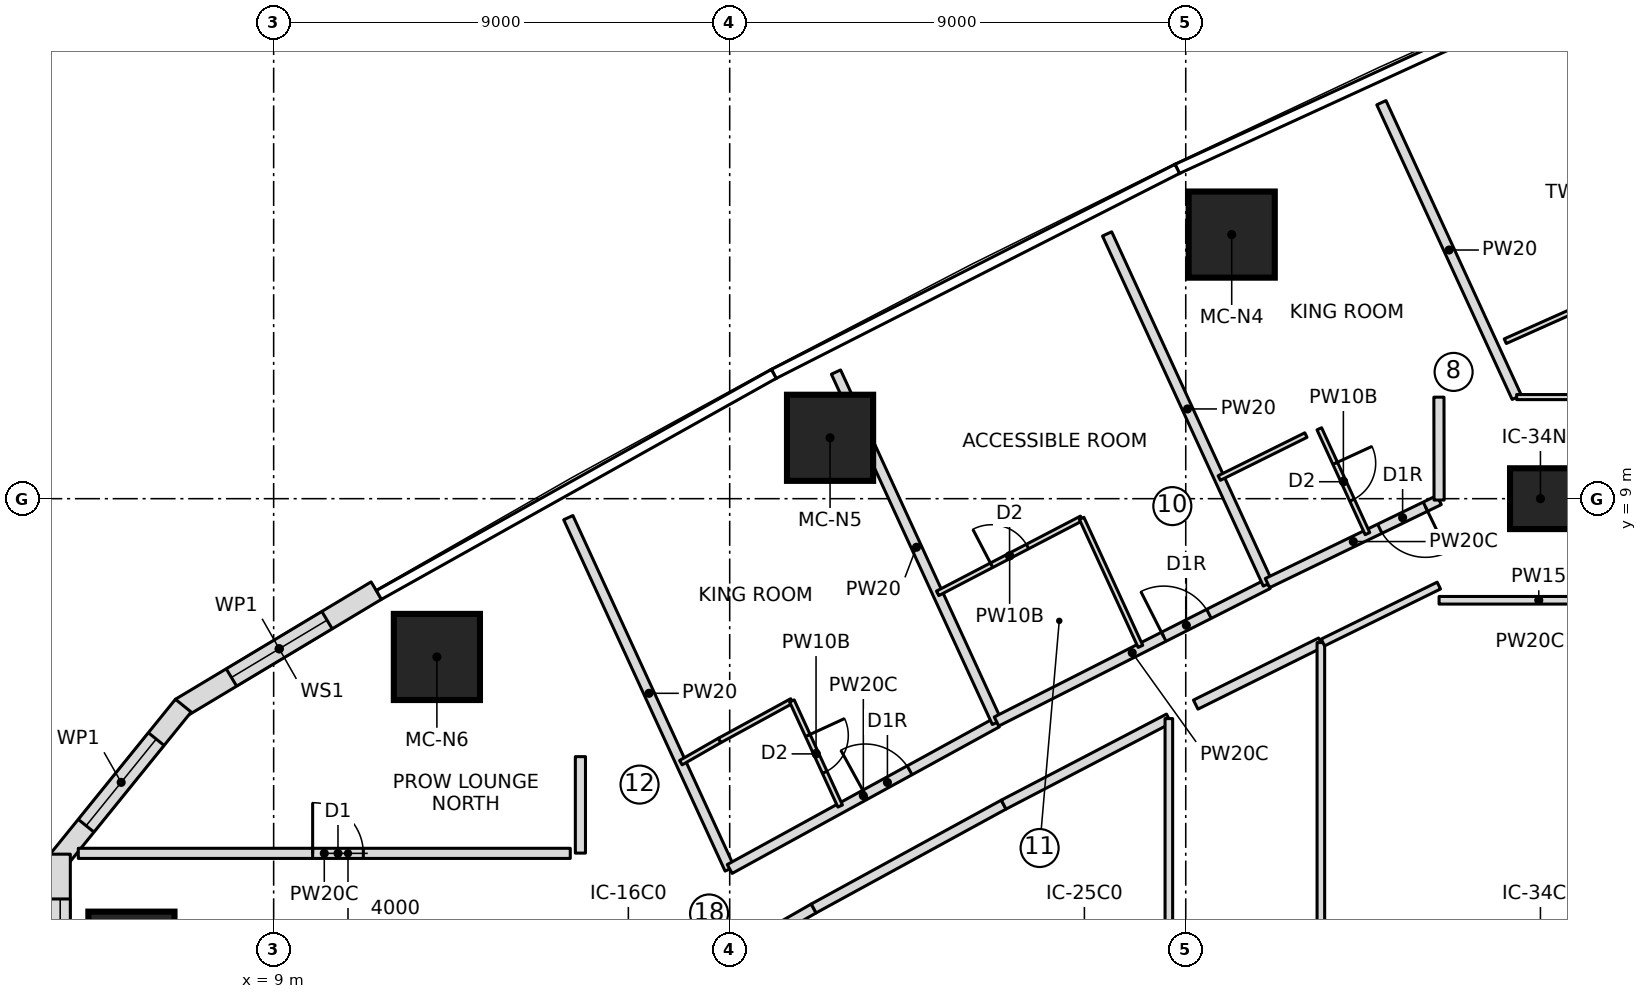
"""IFC4 building model, lengths in metres.
Left out: names, types, materials, properties, quantities, classifications, styles, units other than length and angle.
Written with IfcOpenShell. Run it as: python <this file> out.ifc"""

import sys

from ifc_helpers import new_model, si_unit, direction, frame, frame_2d, origin, origin_2d, place, context, subcontext, project, spatial, polyline, rectangle, outline, extrude, element, fill, save


model = new_model("IFC4")
c1 = context("Model", 3, precision=1e-05, world=origin(), true_north=direction((0.0, 1.0)))
c2 = subcontext(c1, "Body", "Model", "MODEL_VIEW")
j1 = project(units=[si_unit("LENGTHUNIT", "METRE"), si_unit("PLANEANGLEUNIT", "RADIAN")], contexts=[c1])
p1 = place(None, origin())
s1 = spatial("IfcSite", under=j1, at=p1, CompositionType="ELEMENT")
p2 = place(p1, origin())
s2 = spatial("IfcBuilding", under=s1, at=p2, CompositionType="ELEMENT")
p3 = place(p2, frame((0.0, 0.0, 102.65)))
s3 = spatial("IfcBuildingStorey", under=s2, at=p3, CompositionType="ELEMENT", Elevation=102.65)
for number, where, z_axis, x_axis in (
    (1, (6.193, 0.0, 0.0), (0.0, 0.0, 1.0), (1.0, 0.0, 0.0)),
    (2, (27.907, 14.212, 0.0), (0.0, 0.0, 1.0), (1.0, 0.0, 0.0)),
    (3, (19.981, 10.202, 0.0), (0.0, 0.0, 1.0), (1.0, 0.0, 0.0)),
    (4, (12.221, 5.876, 0.0), (0.0, 0.0, 1.0), (1.0, 0.0, 0.0)),
):
    element("IfcColumn", number, at=place(p3, frame(where, z_axis=z_axis, x_axis=x_axis)), inside=s3, PredefinedType="COLUMN", context=c2, shape_type="SweptSolid", body=[
        extrude(rectangle(XDim=1.7, YDim=1.7, at=origin_2d()), origin(), (0.0, 0.0, 1.0), 3.55),
    ])
p4 = place(p3, frame((34.0, 9.0, 0.0), z_axis=(0.0, 0.0, 1.0), x_axis=(1.0, 0.0, 0.0)))
e5 = element("IfcColumn", 5, at=p4, inside=s3, PredefinedType="COLUMN", context=c2, shape_type="SweptSolid", body=[
    extrude(rectangle(XDim=1.2, YDim=1.2, at=origin_2d()), origin(), (0.0, 0.0, 1.0), 3.55),
])
p5 = place(p3, frame((11.026, 7.186, 0.0), z_axis=(0.0, 0.0, 1.0), x_axis=(-0.857550776474, -0.514399325202, 0.0)))
e6 = element("IfcWall", 6, at=p5, inside=s3, PredefinedType="NOTDEFINED", context=c2, shape_type="SweptSolid", body=[
    extrude(outline(polyline([(0.0, -0.2), (4.503, -0.2), (4.433, 0.2), (0.0, 0.2), (0.0, -0.2)])), origin(), (0.0, 0.0, 1.0), 3.25),
])
p6 = place(p5, frame((1.134, 0.0, 0.6)))
e7 = element("IfcOpeningElement", 7, at=p6, cuts=e6, PredefinedType="OPENING", context=c2, shape_type="SweptSolid", body=[
    extrude(outline(polyline([(0.0, 1.35), (0.084, 1.771), (0.322, 2.128), (0.679, 2.366), (1.1, 2.45), (1.521, 2.366), (1.878, 2.128), (2.116, 1.771), (2.2, 1.35), (2.2, 1.1), (2.116, 0.679), (1.878, 0.322), (1.521, 0.084), (1.1, 0.0), (0.679, 0.084), (0.322, 0.322), (0.084, 0.679), (0.0, 1.1), (0.0, 1.35)])), frame((0.0, 0.21, 0.0), z_axis=(0.0, -1.0, 0.0), x_axis=(1.0, 0.0, 0.0)), (0.0, 0.0, 1.0), 0.42),
])
p7 = place(p3, frame((7.194, 4.888, 0.0), z_axis=(0.0, 0.0, 1.0), x_axis=(-0.62903486133, -0.777377092042, 0.0)))
e8 = element("IfcWall", 8, at=p7, inside=s3, PredefinedType="NOTDEFINED", context=c2, shape_type="SweptSolid", body=[
    extrude(outline(polyline([(-0.035, -0.2), (3.897, -0.2), (3.756, 0.2), (0.035, 0.2), (-0.035, -0.2)])), origin(), (0.0, 0.0, 1.0), 3.25),
])
p8 = place(p7, frame((0.813, 0.0, 0.6)))
e9 = element("IfcOpeningElement", 9, at=p8, cuts=e8, PredefinedType="OPENING", context=c2, shape_type="SweptSolid", body=[
    extrude(outline(polyline([(0.0, 1.35), (0.084, 1.771), (0.322, 2.128), (0.679, 2.366), (1.1, 2.45), (1.521, 2.366), (1.878, 2.128), (2.116, 1.771), (2.2, 1.35), (2.2, 1.1), (2.116, 0.679), (1.878, 0.322), (1.521, 0.084), (1.1, 0.0), (0.679, 0.084), (0.322, 0.322), (0.084, 0.679), (0.0, 1.1), (0.0, 1.35)])), frame((0.0, 0.21, 0.0), z_axis=(0.0, -1.0, 0.0), x_axis=(1.0, 0.0, 0.0)), (0.0, 0.0, 1.0), 0.42),
])
p9 = place(p3, frame((4.787, 1.913, 0.0), z_axis=(0.0, 0.0, 1.0), x_axis=(0.0, -1.0, 0.0)))
e10 = element("IfcWall", 10, at=p9, inside=s3, PredefinedType="NOTDEFINED", context=c2, shape_type="SweptSolid", body=[
    extrude(outline(polyline([(-0.071, -0.2), (3.897, -0.2), (3.755, 0.2), (0.071, 0.2), (-0.071, -0.2)])), origin(), (0.0, 0.0, 1.0), 3.25),
])
p10 = place(p9, frame((0.813, 0.0, 0.6)))
e11 = element("IfcOpeningElement", 11, at=p10, cuts=e10, PredefinedType="OPENING", context=c2, shape_type="SweptSolid", body=[
    extrude(outline(polyline([(0.0, 1.35), (0.084, 1.771), (0.322, 2.128), (0.679, 2.366), (1.1, 2.45), (1.521, 2.366), (1.878, 2.128), (2.116, 1.771), (2.2, 1.35), (2.2, 1.1), (2.116, 0.679), (1.878, 0.322), (1.521, 0.084), (1.1, 0.0), (0.679, 0.084), (0.322, 0.322), (0.084, 0.679), (0.0, 1.1), (0.0, 1.35)])), frame((0.0, 0.21, 0.0), z_axis=(0.0, -1.0, 0.0), x_axis=(1.0, 0.0, 0.0)), (0.0, 0.0, 1.0), 0.42),
])
p11 = place(p3, frame((5.145, 2.0, 0.0), z_axis=(0.0, 0.0, 1.0), x_axis=(1.0, 0.0, 0.0)))
e12 = element("IfcWall", 12, at=p11, inside=s3, PredefinedType="PARTITIONING", context=c2, shape_type="SweptSolid", body=[
    extrude(rectangle(XDim=9.709, YDim=0.2, at=frame_2d((4.854, 0.0))), origin(), (0.0, 0.0, 1.0), 3.25),
])
p12 = place(p11, frame((4.625, 0.0, 0.0)))
e13 = element("IfcOpeningElement", 13, at=p12, cuts=e12, PredefinedType="OPENING", context=c2, shape_type="SweptSolid", body=[
    extrude(rectangle(XDim=1.0, YDim=2.1, at=frame_2d((0.5, 1.05))), frame((0.0, 0.11, 0.0), z_axis=(0.0, -1.0, 0.0), x_axis=(1.0, 0.0, 0.0)), (0.0, 0.0, 1.0), 0.22),
])
p13 = place(p3, frame((14.815, 8.626, 0.0), z_axis=(0.0, 0.0, 1.0), x_axis=(0.417432341259, -0.908708006166, 0.0)))
e14 = element("IfcWall", 14, at=p13, inside=s3, PredefinedType="PARTITIONING", context=c2, shape_type="SweptSolid", body=[
    extrude(rectangle(XDim=7.631, YDim=0.2, at=frame_2d((3.815, 0.0))), origin(), (0.0, 0.0, 1.0), 3.25),
])
p14 = place(p3, frame((18.0, 1.692, 0.0), z_axis=(0.0, 0.0, 1.0), x_axis=(0.876809096721, 0.480838650597, 0.0)))
e15 = element("IfcWall", 15, at=p14, inside=s3, PredefinedType="PARTITIONING", context=c2, shape_type="SweptSolid", body=[
    extrude(rectangle(XDim=6.015, YDim=0.2, at=frame_2d((3.008, 0.0))), origin(), (0.0, 0.0, 1.0), 3.25),
])
p15 = place(p14, frame((3.05, 0.0, 0.0)))
e16 = element("IfcOpeningElement", 16, at=p15, cuts=e15, PredefinedType="OPENING", context=c2, shape_type="SweptSolid", body=[
    extrude(rectangle(XDim=1.0, YDim=2.1, at=frame_2d((0.5, 1.05))), frame((0.0, 0.11, 0.0), z_axis=(0.0, -1.0, 0.0), x_axis=(1.0, 0.0, 0.0)), (0.0, 0.0, 1.0), 0.22),
])
p16 = place(p3, frame((17.036, 3.79, 0.0), z_axis=(0.0, 0.0, 1.0), x_axis=(0.867629162742, 0.497211862248, 0.0)))
e17 = element("IfcWall", 17, at=p16, inside=s3, PredefinedType="PARTITIONING", context=c2, shape_type="SweptSolid", body=[
    extrude(rectangle(XDim=0.882, YDim=0.1, at=frame_2d((0.441, 0.0))), origin(), (0.0, 0.0, 1.0), 3.25),
])
p17 = place(p3, frame((17.801, 4.229, 0.0), z_axis=(0.0, 0.0, 1.0), x_axis=(0.877424481957, 0.479714788663, 0.0)))
e18 = element("IfcWall", 18, at=p17, inside=s3, PredefinedType="PARTITIONING", context=c2, shape_type="SweptSolid", body=[
    extrude(rectangle(XDim=1.625, YDim=0.1, at=frame_2d((0.813, 0.0))), origin(), (0.0, 0.0, 1.0), 3.25),
])
p18 = place(p3, frame((19.228, 5.008, 0.0), z_axis=(0.0, 0.0, 1.0), x_axis=(0.417450047292, -0.908699872354, 0.0)))
e19 = element("IfcWall", 19, at=p18, inside=s3, PredefinedType="PARTITIONING", context=c2, shape_type="SweptSolid", body=[
    extrude(rectangle(XDim=2.283, YDim=0.1, at=frame_2d((1.141, 0.0))), origin(), (0.0, 0.0, 1.0), 3.25),
])
p19 = place(p18, frame((0.75, 0.0, 0.0)))
e20 = element("IfcOpeningElement", 20, at=p19, cuts=e19, PredefinedType="OPENING", context=c2, shape_type="SweptSolid", body=[
    extrude(rectangle(XDim=0.8, YDim=2.1, at=frame_2d((0.4, 1.05))), frame((0.0, 0.06, 0.0), z_axis=(0.0, -1.0, 0.0), x_axis=(1.0, 0.0, 0.0)), (0.0, 0.0, 1.0), 0.12),
])
p20 = place(p3, frame((23.274, 4.584, 0.0), z_axis=(0.0, 0.0, 1.0), x_axis=(-0.417440028355, 0.908704474913, 0.0)))
e21 = element("IfcWall", 21, at=p20, inside=s3, PredefinedType="PARTITIONING", context=c2, shape_type="SweptSolid", body=[
    extrude(rectangle(XDim=7.61, YDim=0.2, at=frame_2d((3.805, 0.0))), origin(), (0.0, 0.0, 1.0), 3.25),
])
p21 = place(p3, frame((23.266, 4.602, 0.0), z_axis=(0.0, 0.0, 1.0), x_axis=(0.892007141151, 0.452021304958, 0.0)))
e22 = element("IfcWall", 22, at=p21, inside=s3, PredefinedType="PARTITIONING", context=c2, shape_type="SweptSolid", body=[
    extrude(rectangle(XDim=6.004, YDim=0.2, at=frame_2d((3.002, 0.0))), origin(), (0.0, 0.0, 1.0), 3.25),
])
p22 = place(p21, frame((3.7, 0.0, 0.0)))
e23 = element("IfcOpeningElement", 23, at=p22, cuts=e22, PredefinedType="OPENING", context=c2, shape_type="SweptSolid", body=[
    extrude(rectangle(XDim=1.0, YDim=2.1, at=frame_2d((0.5, 1.05))), frame((0.0, 0.11, 0.0), z_axis=(0.0, -1.0, 0.0), x_axis=(1.0, 0.0, 0.0)), (0.0, 0.0, 1.0), 0.22),
])
p23 = place(p3, frame((22.104, 7.132, 0.0), z_axis=(0.0, 0.0, 1.0), x_axis=(0.886865947566, 0.46202682936, 0.0)))
e24 = element("IfcWall", 24, at=p23, inside=s3, PredefinedType="PARTITIONING", context=c2, shape_type="SweptSolid", body=[
    extrude(rectangle(XDim=3.204, YDim=0.1, at=frame_2d((1.602, 0.0))), origin(), (0.0, 0.0, 1.0), 3.25),
])
p24 = place(p23, frame((1.2, 0.0, 0.0)))
e25 = element("IfcOpeningElement", 25, at=p24, cuts=e24, PredefinedType="OPENING", context=c2, shape_type="SweptSolid", body=[
    extrude(rectangle(XDim=0.8, YDim=2.1, at=frame_2d((0.4, 1.05))), frame((0.0, 0.06, 0.0), z_axis=(0.0, -1.0, 0.0), x_axis=(1.0, 0.0, 0.0)), (0.0, 0.0, 1.0), 0.12),
])
p25 = place(p3, frame((24.945, 8.612, 0.0), z_axis=(0.0, 0.0, 1.0), x_axis=(0.417431588167, -0.908708352113, 0.0)))
e26 = element("IfcWall", 26, at=p25, inside=s3, PredefinedType="PARTITIONING", context=c2, shape_type="SweptSolid", body=[
    extrude(rectangle(XDim=2.781, YDim=0.1, at=frame_2d((1.39, 0.0))), origin(), (0.0, 0.0, 1.0), 3.25),
])
p26 = place(p3, frame((28.622, 7.316, 0.0), z_axis=(0.0, 0.0, 1.0), x_axis=(-0.417428513692, 0.908709764422, 0.0)))
e27 = element("IfcWall", 27, at=p26, inside=s3, PredefinedType="PARTITIONING", context=c2, shape_type="SweptSolid", body=[
    extrude(rectangle(XDim=7.603, YDim=0.2, at=frame_2d((3.802, 0.0))), origin(), (0.0, 0.0, 1.0), 3.25),
])
p27 = place(p3, frame((32.0, 8.973, 0.0), z_axis=(0.0, 0.0, 1.0), x_axis=(-0.900216696569, -0.435442188147, 0.0)))
e28 = element("IfcWall", 28, at=p27, inside=s3, PredefinedType="PARTITIONING", context=c2, shape_type="SweptSolid", body=[
    extrude(rectangle(XDim=3.762, YDim=0.2, at=frame_2d((1.881, 0.0))), origin(), (0.0, 0.0, 1.0), 3.25),
])
p28 = place(p27, frame((0.3, 0.0, 0.0)))
e29 = element("IfcOpeningElement", 29, at=p28, cuts=e28, PredefinedType="OPENING", context=c2, shape_type="SweptSolid", body=[
    extrude(rectangle(XDim=1.0, YDim=2.1, at=frame_2d((0.5, 1.05))), frame((0.0, 0.11, 0.0), z_axis=(0.0, -1.0, 0.0), x_axis=(1.0, 0.0, 0.0)), (0.0, 0.0, 1.0), 0.22),
])
p29 = place(p3, frame((27.661, 9.407, 0.0), z_axis=(0.0, 0.0, 1.0), x_axis=(0.895982200486, 0.444089964324, 0.0)))
e30 = element("IfcWall", 30, at=p29, inside=s3, PredefinedType="PARTITIONING", context=c2, shape_type="SweptSolid", body=[
    extrude(rectangle(XDim=1.909, YDim=0.1, at=frame_2d((0.954, 0.0))), origin(), (0.0, 0.0, 1.0), 3.25),
])
p30 = place(p3, frame((29.635, 10.38, 0.0), z_axis=(0.0, 0.0, 1.0), x_axis=(0.417466676952, -0.908692232626, 0.0)))
e31 = element("IfcWall", 31, at=p30, inside=s3, PredefinedType="PARTITIONING", context=c2, shape_type="SweptSolid", body=[
    extrude(rectangle(XDim=2.277, YDim=0.1, at=frame_2d((1.139, 0.0))), origin(), (0.0, 0.0, 1.0), 3.25),
])
p31 = place(p30, frame((0.75, 0.0, 0.0)))
e32 = element("IfcOpeningElement", 32, at=p31, cuts=e31, PredefinedType="OPENING", context=c2, shape_type="SweptSolid", body=[
    extrude(rectangle(XDim=0.8, YDim=2.1, at=frame_2d((0.4, 1.05))), frame((0.0, 0.06, 0.0), z_axis=(0.0, -1.0, 0.0), x_axis=(1.0, 0.0, 0.0)), (0.0, 0.0, 1.0), 0.12),
])
p32 = place(p3, frame((33.532, 11.0, 0.0), z_axis=(0.0, 0.0, 1.0), x_axis=(-0.417441426461, 0.908703832651, 0.0)))
e33 = element("IfcWall", 33, at=p32, inside=s3, PredefinedType="PARTITIONING", context=c2, shape_type="SweptSolid", body=[
    extrude(rectangle(XDim=6.399, YDim=0.2, at=frame_2d((3.2, 0.0))), origin(), (0.0, 0.0, 1.0), 3.25),
])
p33 = place(p3, frame((33.306, 12.108, 0.0), z_axis=(0.0, 0.0, 1.0), x_axis=(0.913060453705, 0.407824236504, 0.0)))
e34 = element("IfcWall", 34, at=p33, inside=s3, PredefinedType="PARTITIONING", context=c2, shape_type="SweptSolid", body=[
    extrude(rectangle(XDim=2.243, YDim=0.1, at=frame_2d((1.122, 0.0))), origin(), (0.0, 0.0, 1.0), 3.25),
])
p34 = place(p3, frame((18.065, 0.0, 0.0), z_axis=(0.0, 0.0, 1.0), x_axis=(0.867694156962, 0.49709843087, 0.0)))
e35 = element("IfcWall", 35, at=p34, inside=s3, PredefinedType="PARTITIONING", context=c2, shape_type="SweptSolid", body=[
    extrude(rectangle(XDim=1.835, YDim=0.2, at=frame_2d((0.918, 0.0))), origin(), (0.0, 0.0, 1.0), 3.25),
])
p35 = place(p3, frame((19.657, 0.912, 0.0), z_axis=(0.0, 0.0, 1.0), x_axis=(0.877465075585, 0.479640533242, 0.0)))
e36 = element("IfcWall", 36, at=p35, inside=s3, PredefinedType="PARTITIONING", context=c2, shape_type="SweptSolid", body=[
    extrude(rectangle(XDim=4.273, YDim=0.2, at=frame_2d((2.137, 0.0))), origin(), (0.0, 0.0, 1.0), 3.25),
])
p36 = place(p3, frame((23.407, 2.962, 0.0), z_axis=(0.0, 0.0, 1.0), x_axis=(0.886891405098, 0.46197796004, 0.0)))
e37 = element("IfcWall", 37, at=p36, inside=s3, PredefinedType="PARTITIONING", context=c2, shape_type="SweptSolid", body=[
    extrude(rectangle(XDim=3.676, YDim=0.2, at=frame_2d((1.838, 0.0))), origin(), (0.0, 0.0, 1.0), 3.25),
])
p37 = place(p3, frame((26.667, -4.66, 0.0), z_axis=(0.0, 0.0, 1.0), x_axis=(0.0, 1.0, 0.0)))
e38 = element("IfcWall", 38, at=p37, inside=s3, PredefinedType="PARTITIONING", context=c2, shape_type="SweptSolid", body=[
    extrude(rectangle(XDim=9.32, YDim=0.15, at=frame_2d((4.66, 0.0))), origin(), (0.0, 0.0, 1.0), 3.25),
])
p38 = place(p3, frame((27.196, 4.936, 0.0), z_axis=(0.0, 0.0, 1.0), x_axis=(0.895945057464, 0.444164895062, 0.0)))
e39 = element("IfcWall", 39, at=p38, inside=s3, PredefinedType="PARTITIONING", context=c2, shape_type="SweptSolid", body=[
    extrude(rectangle(XDim=2.757, YDim=0.2, at=frame_2d((1.378, 0.0))), origin(), (0.0, 0.0, 1.0), 3.25),
])
p39 = place(p3, frame((29.667, -6.16, 0.0), z_axis=(0.0, 0.0, 1.0), x_axis=(0.0, 1.0, 0.0)))
e40 = element("IfcWall", 40, at=p39, inside=s3, PredefinedType="PARTITIONING", context=c2, shape_type="SweptSolid", body=[
    extrude(rectangle(XDim=12.321, YDim=0.15, at=frame_2d((6.16, 0.0))), origin(), (0.0, 0.0, 1.0), 3.25),
])
p40 = place(p3, frame((36.0, 11.005, 0.0), z_axis=(0.0, 0.0, 1.0), x_axis=(-1.0, 0.0, 0.0)))
e41 = element("IfcWall", 41, at=p40, inside=s3, PredefinedType="PARTITIONING", context=c2, shape_type="SweptSolid", body=[
    extrude(rectangle(XDim=2.47, YDim=0.1, at=frame_2d((1.235, 0.0))), origin(), (0.0, 0.0, 1.0), 3.25),
])
p41 = place(p3, frame((29.707, 6.162, 0.0), z_axis=(0.0, 0.0, 1.0), x_axis=(0.89773510237, 0.440535680702, 0.0)))
e42 = element("IfcWall", 42, at=p41, inside=s3, PredefinedType="PARTITIONING", context=c2, shape_type="SweptSolid", body=[
    extrude(rectangle(XDim=2.549, YDim=0.15, at=frame_2d((1.275, 0.0))), origin(), (0.0, 0.0, 1.0), 3.25),
])
p42 = place(p3, frame((32.0, 6.995, 0.0), z_axis=(0.0, 0.0, 1.0), x_axis=(1.0, 0.0, 0.0)))
e43 = element("IfcWall", 43, at=p42, inside=s3, PredefinedType="PARTITIONING", context=c2, shape_type="SweptSolid", body=[
    extrude(rectangle(XDim=3.935, YDim=0.15, at=frame_2d((1.968, 0.0))), origin(), (0.0, 0.0, 1.0), 3.25),
])
p43 = place(p3, frame((15.054, 3.909, 0.0), z_axis=(0.0, 0.0, 1.0), x_axis=(0.0, -1.0, 0.0)))
e44 = element("IfcWall", 44, at=p43, inside=s3, PredefinedType="PARTITIONING", context=c2, shape_type="SweptSolid", body=[
    extrude(rectangle(XDim=1.904, YDim=0.2, at=frame_2d((0.952, 0.0))), origin(), (0.0, 0.0, 1.0), 3.25),
])
p44 = place(p3, frame((31.997, 11.003, 0.0), z_axis=(0.0, 0.0, 1.0), x_axis=(0.001683296882, -0.999998583255, 0.0)))
e45 = element("IfcWall", 45, at=p44, inside=s3, PredefinedType="PARTITIONING", context=c2, shape_type="SweptSolid", body=[
    extrude(rectangle(XDim=2.031, YDim=0.2, at=frame_2d((1.015, 0.0))), origin(), (0.0, 0.0, 1.0), 3.25),
])
p45 = place(p6, origin())
e46 = element("IfcWindow", 46, at=p45, inside=s3, PartitioningType="SINGLE_PANEL", PredefinedType="WINDOW", context=c2, shape_type="SweptSolid", body=[
    extrude(outline(polyline([(0.0, 1.35), (0.084, 1.771), (0.322, 2.128), (0.679, 2.366), (1.1, 2.45), (1.521, 2.366), (1.878, 2.128), (2.116, 1.771), (2.2, 1.35), (2.2, 1.1), (2.116, 0.679), (1.878, 0.322), (1.521, 0.084), (1.1, 0.0), (0.679, 0.084), (0.322, 0.322), (0.084, 0.679), (0.0, 1.1), (0.0, 1.35)])), frame((0.0, 0.17, 0.0), z_axis=(0.0, -1.0, 0.0), x_axis=(1.0, 0.0, 0.0)), (0.0, 0.0, 1.0), 0.06),
])
fill(e7, e46)
p46 = place(p8, origin())
e47 = element("IfcWindow", 47, at=p46, inside=s3, PartitioningType="SINGLE_PANEL", PredefinedType="WINDOW", context=c2, shape_type="SweptSolid", body=[
    extrude(outline(polyline([(0.0, 1.35), (0.084, 1.771), (0.322, 2.128), (0.679, 2.366), (1.1, 2.45), (1.521, 2.366), (1.878, 2.128), (2.116, 1.771), (2.2, 1.35), (2.2, 1.1), (2.116, 0.679), (1.878, 0.322), (1.521, 0.084), (1.1, 0.0), (0.679, 0.084), (0.322, 0.322), (0.084, 0.679), (0.0, 1.1), (0.0, 1.35)])), frame((0.0, 0.17, 0.0), z_axis=(0.0, -1.0, 0.0), x_axis=(1.0, 0.0, 0.0)), (0.0, 0.0, 1.0), 0.06),
])
fill(e9, e47)
p47 = place(p10, origin())
e48 = element("IfcWindow", 48, at=p47, inside=s3, PartitioningType="SINGLE_PANEL", PredefinedType="WINDOW", context=c2, shape_type="SweptSolid", body=[
    extrude(outline(polyline([(0.0, 1.35), (0.084, 1.771), (0.322, 2.128), (0.679, 2.366), (1.1, 2.45), (1.521, 2.366), (1.878, 2.128), (2.116, 1.771), (2.2, 1.35), (2.2, 1.1), (2.116, 0.679), (1.878, 0.322), (1.521, 0.084), (1.1, 0.0), (0.679, 0.084), (0.322, 0.322), (0.084, 0.679), (0.0, 1.1), (0.0, 1.35)])), frame((0.0, 0.17, 0.0), z_axis=(0.0, -1.0, 0.0), x_axis=(1.0, 0.0, 0.0)), (0.0, 0.0, 1.0), 0.06),
])
fill(e11, e48)
p48 = place(p12, origin())
e49 = element("IfcDoor", 49, at=p48, inside=s3, OperationType="SINGLE_SWING_LEFT", PredefinedType="DOOR", context=c2, shape_type="SweptSolid", body=[
    extrude(rectangle(XDim=1.0, YDim=2.1, at=frame_2d((0.5, 1.05))), frame((0.0, 0.025, 0.0), z_axis=(0.0, -1.0, 0.0), x_axis=(1.0, 0.0, 0.0)), (0.0, 0.0, 1.0), 0.05),
])
fill(e13, e49)
p49 = place(p19, origin())
e50 = element("IfcDoor", 50, at=p49, inside=s3, OperationType="SINGLE_SWING_LEFT", PredefinedType="DOOR", context=c2, shape_type="SweptSolid", body=[
    extrude(rectangle(XDim=0.8, YDim=2.1, at=frame_2d((0.4, 1.05))), frame((0.0, 0.025, 0.0), z_axis=(0.0, -1.0, 0.0), x_axis=(1.0, 0.0, 0.0)), (0.0, 0.0, 1.0), 0.05),
])
fill(e20, e50)
p50 = place(p15, origin())
e51 = element("IfcDoor", 51, at=p50, inside=s3, OperationType="SINGLE_SWING_RIGHT", PredefinedType="DOOR", context=c2, shape_type="SweptSolid", body=[
    extrude(rectangle(XDim=1.0, YDim=2.1, at=frame_2d((0.5, 1.05))), frame((0.0, 0.025, 0.0), z_axis=(0.0, -1.0, 0.0), x_axis=(1.0, 0.0, 0.0)), (0.0, 0.0, 1.0), 0.05),
])
fill(e16, e51)
p51 = place(p24, origin())
e52 = element("IfcDoor", 52, at=p51, inside=s3, OperationType="SINGLE_SWING_LEFT", PredefinedType="DOOR", context=c2, shape_type="SweptSolid", body=[
    extrude(rectangle(XDim=0.8, YDim=2.1, at=frame_2d((0.4, 1.05))), frame((0.0, 0.025, 0.0), z_axis=(0.0, -1.0, 0.0), x_axis=(1.0, 0.0, 0.0)), (0.0, 0.0, 1.0), 0.05),
])
fill(e25, e52)
p52 = place(p22, origin())
e53 = element("IfcDoor", 53, at=p52, inside=s3, OperationType="SINGLE_SWING_RIGHT", PredefinedType="DOOR", context=c2, shape_type="SweptSolid", body=[
    extrude(rectangle(XDim=1.0, YDim=2.1, at=frame_2d((0.5, 1.05))), frame((0.0, 0.025, 0.0), z_axis=(0.0, -1.0, 0.0), x_axis=(1.0, 0.0, 0.0)), (0.0, 0.0, 1.0), 0.05),
])
fill(e23, e53)
p53 = place(p31, origin())
e54 = element("IfcDoor", 54, at=p53, inside=s3, OperationType="SINGLE_SWING_LEFT", PredefinedType="DOOR", context=c2, shape_type="SweptSolid", body=[
    extrude(rectangle(XDim=0.8, YDim=2.1, at=frame_2d((0.4, 1.05))), frame((0.0, 0.025, 0.0), z_axis=(0.0, -1.0, 0.0), x_axis=(1.0, 0.0, 0.0)), (0.0, 0.0, 1.0), 0.05),
])
fill(e32, e54)
p54 = place(p28, origin())
e55 = element("IfcDoor", 55, at=p54, inside=s3, OperationType="SINGLE_SWING_RIGHT", PredefinedType="DOOR", context=c2, shape_type="SweptSolid", body=[
    extrude(rectangle(XDim=1.0, YDim=2.1, at=frame_2d((0.5, 1.05))), frame((0.0, 0.025, 0.0), z_axis=(0.0, -1.0, 0.0), x_axis=(1.0, 0.0, 0.0)), (0.0, 0.0, 1.0), 0.05),
])
fill(e29, e55)
save(model, sys.argv[1])
